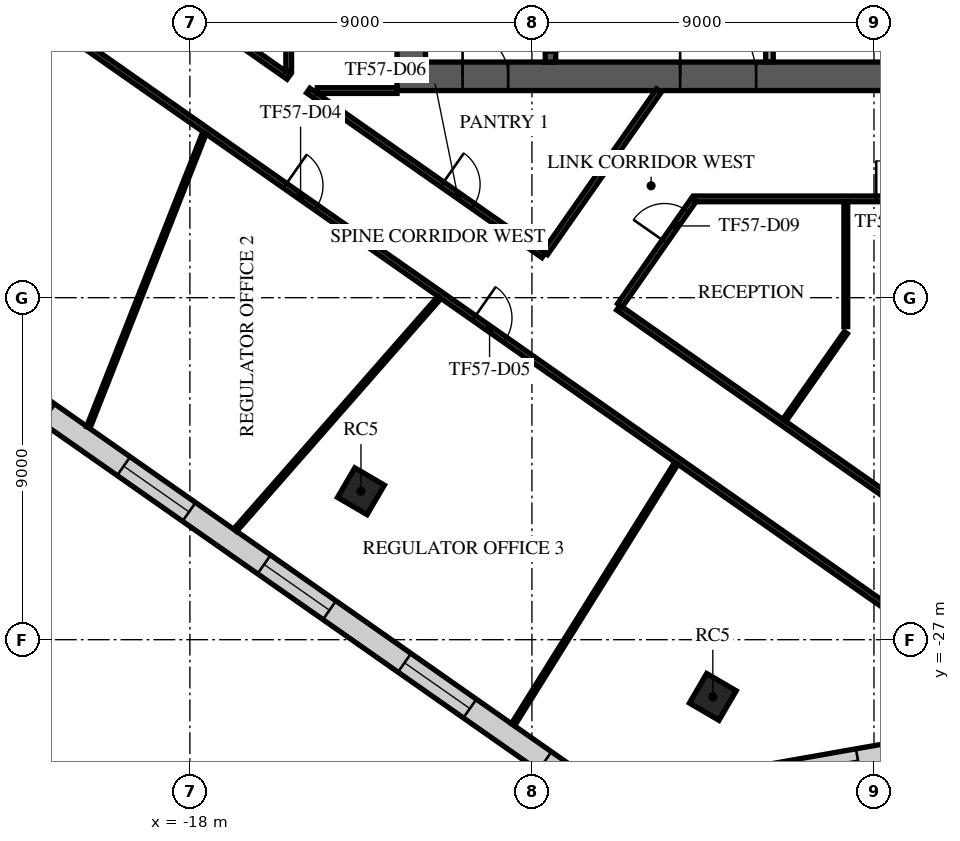
"""IFC4 building model, lengths in metres.
Left out: names, types, materials, properties, quantities, classifications, styles, units other than length and angle.
Written with IfcOpenShell. Run it as: python <this file> out.ifc"""

import sys

from ifc_helpers import new_model, si_unit, direction, frame, frame_2d, origin, origin_2d, place, context, subcontext, project, spatial, rectangle, extrude, element, fill, save


model = new_model("IFC4")
c1 = context("Model", 3, precision=1e-05, world=origin(), true_north=direction((0.0, 1.0)))
c2 = subcontext(c1, "Body", "Model", "MODEL_VIEW")
j1 = project(units=[si_unit("LENGTHUNIT", "METRE"), si_unit("PLANEANGLEUNIT", "RADIAN")], contexts=[c1])
p1 = place(None, origin())
s1 = spatial("IfcSite", under=j1, at=p1, CompositionType="ELEMENT")
p2 = place(p1, origin())
s2 = spatial("IfcBuilding", under=s1, at=p2, CompositionType="ELEMENT")
p3 = place(p2, frame((0.0, 0.0, 246.9)))
s3 = spatial("IfcBuildingStorey", under=s2, at=p3, CompositionType="ELEMENT", Elevation=246.9)
for number, where, z_axis, x_axis in (
    (1, (-13.499, -23.094, 0.0), (0.0, 0.0, 1.0), (0.505, 0.863, 0.0)),
    (2, (-4.24, -28.506, 0.0), (0.0, 0.0, 1.0), (0.505, 0.863, 0.0)),
):
    element("IfcColumn", number, at=place(p3, frame(where, z_axis=z_axis, x_axis=x_axis)), inside=s3, PredefinedType="COLUMN", context=c2, shape_type="SweptSolid", body=[
        extrude(rectangle(XDim=0.9, YDim=0.9, at=origin_2d()), origin(), (0.0, 0.0, 1.0), 4.0),
    ])
p4 = place(p3, frame((-12.55, -12.175, 0.0), z_axis=(0.0, 0.0, 1.0), x_axis=(1.0, 0.0, 0.0)))
e3 = element("IfcWall", 3, at=p4, inside=s3, PredefinedType="SHEAR", context=c2, shape_type="SweptSolid", body=[
    extrude(rectangle(XDim=25.1, YDim=0.75, at=frame_2d((12.55, 0.0))), origin(), (0.0, 0.0, 1.0), 3.64),
])
p5 = place(p4, frame((7.45, 0.0, 0.0)))
e4 = element("IfcOpeningElement", 4, at=p5, cuts=e3, PredefinedType="OPENING", context=c2, shape_type="SweptSolid", body=[
    extrude(rectangle(XDim=2.0, YDim=2.1, at=frame_2d((1.0, 1.05))), frame((0.0, 0.385, 0.0), z_axis=(0.0, -1.0, 0.0), x_axis=(1.0, 0.0, 0.0)), (0.0, 0.0, 1.0), 0.77),
])
p6 = place(p4, frame((17.575, 0.0, 0.0)))
e5 = element("IfcOpeningElement", 5, at=p6, cuts=e3, PredefinedType="OPENING", context=c2, shape_type="SweptSolid", body=[
    extrude(rectangle(XDim=1.2, YDim=2.1, at=frame_2d((0.6, 1.05))), frame((0.0, 0.385, 0.0), z_axis=(0.0, -1.0, 0.0), x_axis=(1.0, 0.0, 0.0)), (0.0, 0.0, 1.0), 0.77),
])
p7 = place(p4, frame((1.725, 0.0, 0.0)))
e6 = element("IfcOpeningElement", 6, at=p7, cuts=e3, PredefinedType="OPENING", context=c2, shape_type="SweptSolid", body=[
    extrude(rectangle(XDim=1.2, YDim=2.1, at=frame_2d((0.6, 1.05))), frame((0.0, 0.385, 0.0), z_axis=(0.0, -1.0, 0.0), x_axis=(1.0, 0.0, 0.0)), (0.0, 0.0, 1.0), 0.77),
])
p8 = place(p4, frame((22.175, 0.0, 0.0)))
e7 = element("IfcOpeningElement", 7, at=p8, cuts=e3, PredefinedType="OPENING", context=c2, shape_type="SweptSolid", body=[
    extrude(rectangle(XDim=1.2, YDim=2.1, at=frame_2d((0.6, 1.05))), frame((0.0, 0.385, 0.0), z_axis=(0.0, -1.0, 0.0), x_axis=(1.0, 0.0, 0.0)), (0.0, 0.0, 1.0), 0.77),
])
p9 = place(p3, frame((-12.175, -11.8, 0.0), z_axis=(0.0, 0.0, 1.0), x_axis=(0.0, 1.0, 0.0)))
e8 = element("IfcWall", 8, at=p9, inside=s3, PredefinedType="SHEAR", context=c2, shape_type="SweptSolid", body=[
    extrude(rectangle(XDim=23.6, YDim=0.75, at=frame_2d((11.8, 0.0))), origin(), (0.0, 0.0, 1.0), 3.64),
])
p10 = place(p9, frame((10.6, 0.0, 0.0)))
e9 = element("IfcOpeningElement", 9, at=p10, cuts=e8, PredefinedType="OPENING", context=c2, shape_type="SweptSolid", body=[
    extrude(rectangle(XDim=2.4, YDim=2.4, at=frame_2d((1.2, 1.2))), frame((0.0, 0.385, 0.0), z_axis=(0.0, -1.0, 0.0), x_axis=(1.0, 0.0, 0.0)), (0.0, 0.0, 1.0), 0.77),
])
p11 = place(p3, frame((-8.512, -4.55, 0.0), z_axis=(0.0, 0.0, 1.0), x_axis=(0.0, -1.0, 0.0)))
e10 = element("IfcWall", 10, at=p11, inside=s3, PredefinedType="SOLIDWALL", context=c2, shape_type="SweptSolid", body=[
    extrude(rectangle(XDim=7.25, YDim=0.275, at=frame_2d((3.625, 0.0))), origin(), (0.0, 0.0, 1.0), 3.64),
])
p12 = place(p11, frame((6.0, 0.0, 0.0)))
e11 = element("IfcOpeningElement", 11, at=p12, cuts=e10, PredefinedType="OPENING", context=c2, shape_type="SweptSolid", body=[
    extrude(rectangle(XDim=1.0, YDim=2.1, at=frame_2d((0.5, 1.05))), frame((0.0, 0.147, 0.0), z_axis=(0.0, -1.0, 0.0), x_axis=(1.0, 0.0, 0.0)), (0.0, 0.0, 1.0), 0.295),
])
p13 = place(p3, frame((-2.75, -11.795, 0.0), z_axis=(0.0, 0.0, 1.0), x_axis=(0.0, 1.0, 0.0)))
e12 = element("IfcWall", 12, at=p13, inside=s3, PredefinedType="PARTITIONING", context=c2, shape_type="SweptSolid", body=[
    extrude(rectangle(XDim=2.99, YDim=0.2, at=frame_2d((1.495, 0.0))), origin(), (0.0, 0.0, 1.0), 3.64),
])
p14 = place(p13, frame((0.657, 0.0, 0.0)))
e13 = element("IfcOpeningElement", 13, at=p14, cuts=e12, PredefinedType="OPENING", context=c2, shape_type="SweptSolid", body=[
    extrude(rectangle(XDim=1.8, YDim=2.1, at=frame_2d((0.9, 1.05))), frame((0.0, 0.11, 0.0), z_axis=(0.0, -1.0, 0.0), x_axis=(1.0, 0.0, 0.0)), (0.0, 0.0, 1.0), 0.22),
])
p15 = place(p3, frame((-31.815, -13.98, 0.0), z_axis=(0.0, 0.0, 1.0), x_axis=(0.819151180661, -0.573577669737, 0.0)))
e14 = element("IfcWall", 14, at=p15, inside=s3, PredefinedType="STANDARD", context=c2, shape_type="SweptSolid", body=[
    extrude(rectangle(XDim=36.086, YDim=0.6, at=frame_2d((18.043, 0.0))), origin(), (0.0, 0.0, 1.0), 3.64),
])
p16 = place(p15, frame((1.205, 0.0, 0.9)))
e15 = element("IfcOpeningElement", 15, at=p16, cuts=e14, PredefinedType="OPENING", context=c2, shape_type="SweptSolid", body=[
    extrude(rectangle(XDim=2.1, YDim=2.1, at=frame_2d((1.05, 1.05))), frame((0.0, 0.31, 0.0), z_axis=(0.0, -1.0, 0.0), x_axis=(1.0, 0.0, 0.0)), (0.0, 0.0, 1.0), 0.62),
])
p17 = place(p15, frame((5.716, 0.0, 0.9)))
e16 = element("IfcOpeningElement", 16, at=p17, cuts=e14, PredefinedType="OPENING", context=c2, shape_type="SweptSolid", body=[
    extrude(rectangle(XDim=2.1, YDim=2.1, at=frame_2d((1.05, 1.05))), frame((0.0, 0.31, 0.0), z_axis=(0.0, -1.0, 0.0), x_axis=(1.0, 0.0, 0.0)), (0.0, 0.0, 1.0), 0.62),
])
p18 = place(p15, frame((10.227, 0.0, 0.9)))
e17 = element("IfcOpeningElement", 17, at=p18, cuts=e14, PredefinedType="OPENING", context=c2, shape_type="SweptSolid", body=[
    extrude(rectangle(XDim=2.1, YDim=2.1, at=frame_2d((1.05, 1.05))), frame((0.0, 0.31, 0.0), z_axis=(0.0, -1.0, 0.0), x_axis=(1.0, 0.0, 0.0)), (0.0, 0.0, 1.0), 0.62),
])
p19 = place(p15, frame((14.738, 0.0, 0.9)))
e18 = element("IfcOpeningElement", 18, at=p19, cuts=e14, PredefinedType="OPENING", context=c2, shape_type="SweptSolid", body=[
    extrude(rectangle(XDim=2.1, YDim=2.1, at=frame_2d((1.05, 1.05))), frame((0.0, 0.31, 0.0), z_axis=(0.0, -1.0, 0.0), x_axis=(1.0, 0.0, 0.0)), (0.0, 0.0, 1.0), 0.62),
])
p20 = place(p15, frame((19.249, 0.0, 0.9)))
e19 = element("IfcOpeningElement", 19, at=p20, cuts=e14, PredefinedType="OPENING", context=c2, shape_type="SweptSolid", body=[
    extrude(rectangle(XDim=2.1, YDim=2.1, at=frame_2d((1.05, 1.05))), frame((0.0, 0.31, 0.0), z_axis=(0.0, -1.0, 0.0), x_axis=(1.0, 0.0, 0.0)), (0.0, 0.0, 1.0), 0.62),
])
p21 = place(p15, frame((23.759, 0.0, 0.9)))
e20 = element("IfcOpeningElement", 20, at=p21, cuts=e14, PredefinedType="OPENING", context=c2, shape_type="SweptSolid", body=[
    extrude(rectangle(XDim=2.1, YDim=2.1, at=frame_2d((1.05, 1.05))), frame((0.0, 0.31, 0.0), z_axis=(0.0, -1.0, 0.0), x_axis=(1.0, 0.0, 0.0)), (0.0, 0.0, 1.0), 0.62),
])
p22 = place(p15, frame((28.27, 0.0, 0.9)))
e21 = element("IfcOpeningElement", 21, at=p22, cuts=e14, PredefinedType="OPENING", context=c2, shape_type="SweptSolid", body=[
    extrude(rectangle(XDim=2.1, YDim=2.1, at=frame_2d((1.05, 1.05))), frame((0.0, 0.31, 0.0), z_axis=(0.0, -1.0, 0.0), x_axis=(1.0, 0.0, 0.0)), (0.0, 0.0, 1.0), 0.62),
])
p23 = place(p15, frame((32.781, 0.0, 0.9)))
e22 = element("IfcOpeningElement", 22, at=p23, cuts=e14, PredefinedType="OPENING", context=c2, shape_type="SweptSolid", body=[
    extrude(rectangle(XDim=2.1, YDim=2.1, at=frame_2d((1.05, 1.05))), frame((0.0, 0.31, 0.0), z_axis=(0.0, -1.0, 0.0), x_axis=(1.0, 0.0, 0.0)), (0.0, 0.0, 1.0), 0.62),
])
p24 = place(p3, frame((-3.18, -30.654, 0.0), z_axis=(0.0, 0.0, 1.0), x_axis=(0.98480904719, 0.173640837858, 0.0)))
e23 = element("IfcWall", 23, at=p24, inside=s3, PredefinedType="STANDARD", context=c2, shape_type="SweptSolid", body=[
    extrude(rectangle(XDim=8.0, YDim=0.6, at=frame_2d((4.0, 0.0))), origin(), (0.0, 0.0, 1.0), 3.64),
])
p25 = place(p24, frame((1.2, 0.0, 0.9)))
e24 = element("IfcOpeningElement", 24, at=p25, cuts=e23, PredefinedType="OPENING", context=c2, shape_type="SweptSolid", body=[
    extrude(rectangle(XDim=1.6, YDim=2.1, at=frame_2d((0.8, 1.05))), frame((0.0, 0.31, 0.0), z_axis=(0.0, -1.0, 0.0), x_axis=(1.0, 0.0, 0.0)), (0.0, 0.0, 1.0), 0.62),
])
p26 = place(p24, frame((5.2, 0.0, 0.9)))
e25 = element("IfcOpeningElement", 25, at=p26, cuts=e23, PredefinedType="OPENING", context=c2, shape_type="SweptSolid", body=[
    extrude(rectangle(XDim=1.6, YDim=2.1, at=frame_2d((0.8, 1.05))), frame((0.0, 0.31, 0.0), z_axis=(0.0, -1.0, 0.0), x_axis=(1.0, 0.0, 0.0)), (0.0, 0.0, 1.0), 0.62),
])
p27 = place(p3, frame((-26.231, -7.537, 0.0), z_axis=(0.0, 0.0, 1.0), x_axis=(0.819166569978, -0.573555690959, 0.0)))
e26 = element("IfcWall", 26, at=p27, inside=s3, PredefinedType="PARTITIONING", context=c2, shape_type="SweptSolid", body=[
    extrude(rectangle(XDim=34.403, YDim=0.15, at=frame_2d((17.201, 0.0))), origin(), (0.0, 0.0, 1.0), 3.24),
])
p28 = place(p27, frame((3.05, 0.0, 0.0)))
e27 = element("IfcOpeningElement", 27, at=p28, cuts=e26, PredefinedType="OPENING", context=c2, shape_type="SweptSolid", body=[
    extrude(rectangle(XDim=1.8, YDim=2.1, at=frame_2d((0.9, 1.05))), frame((0.0, 0.085, 0.0), z_axis=(0.0, -1.0, 0.0), x_axis=(1.0, 0.0, 0.0)), (0.0, 0.0, 1.0), 0.17),
])
p29 = place(p27, frame((13.103, 0.0, 0.0)))
e28 = element("IfcOpeningElement", 28, at=p29, cuts=e26, PredefinedType="OPENING", context=c2, shape_type="SweptSolid", body=[
    extrude(rectangle(XDim=1.0, YDim=2.1, at=frame_2d((0.5, 1.05))), frame((0.0, 0.085, 0.0), z_axis=(0.0, -1.0, 0.0), x_axis=(1.0, 0.0, 0.0)), (0.0, 0.0, 1.0), 0.17),
])
p30 = place(p27, frame((19.173, 0.0, 0.0)))
e29 = element("IfcOpeningElement", 29, at=p30, cuts=e26, PredefinedType="OPENING", context=c2, shape_type="SweptSolid", body=[
    extrude(rectangle(XDim=1.0, YDim=2.1, at=frame_2d((0.5, 1.05))), frame((0.0, 0.085, 0.0), z_axis=(0.0, -1.0, 0.0), x_axis=(1.0, 0.0, 0.0)), (0.0, 0.0, 1.0), 0.17),
])
p31 = place(p3, frame((-24.854, -5.571, 0.0), z_axis=(0.0, 0.0, 1.0), x_axis=(0.819176259714, -0.573541851586, 0.0)))
e30 = element("IfcWall", 30, at=p31, inside=s3, PredefinedType="PARTITIONING", context=c2, shape_type="SweptSolid", body=[
    extrude(rectangle(XDim=11.54, YDim=0.15, at=frame_2d((5.77, 0.0))), origin(), (0.0, 0.0, 1.0), 3.24),
])
p32 = place(p31, frame((6.8, 0.0, 0.0)))
e31 = element("IfcOpeningElement", 31, at=p32, cuts=e30, PredefinedType="OPENING", context=c2, shape_type="SweptSolid", body=[
    extrude(rectangle(XDim=1.0, YDim=2.1, at=frame_2d((0.5, 1.05))), frame((0.0, 0.085, 0.0), z_axis=(0.0, -1.0, 0.0), x_axis=(1.0, 0.0, 0.0)), (0.0, 0.0, 1.0), 0.17),
])
p33 = place(p3, frame((-15.4, -12.046, 0.0), z_axis=(0.0, 0.0, 1.0), x_axis=(0.0, 1.0, 0.0)))
e32 = element("IfcWall", 32, at=p33, inside=s3, PredefinedType="PARTITIONING", context=c2, shape_type="SweptSolid", body=[
    extrude(rectangle(XDim=27.446, YDim=0.15, at=frame_2d((13.723, 0.0))), origin(), (0.0, 0.0, 1.0), 3.24),
])
p34 = place(p33, frame((12.961, 0.0, 0.0)))
e33 = element("IfcOpeningElement", 33, at=p34, cuts=e32, PredefinedType="OPENING", context=c2, shape_type="SweptSolid", body=[
    extrude(rectangle(XDim=1.0, YDim=2.1, at=frame_2d((0.5, 1.05))), frame((0.0, 0.085, 0.0), z_axis=(0.0, -1.0, 0.0), x_axis=(1.0, 0.0, 0.0)), (0.0, 0.0, 1.0), 0.17),
])
p35 = place(p3, frame((-14.886, -12.55, 0.0), z_axis=(0.0, 0.0, 1.0), x_axis=(0.819131763787, -0.57360539882, 0.0)))
e34 = element("IfcWall", 34, at=p35, inside=s3, PredefinedType="PARTITIONING", context=c2, shape_type="SweptSolid", body=[
    extrude(rectangle(XDim=7.559, YDim=0.15, at=frame_2d((3.78, 0.0))), origin(), (0.0, 0.0, 1.0), 3.24),
])
p36 = place(p35, frame((4.3, 0.0, 0.0)))
e35 = element("IfcOpeningElement", 35, at=p36, cuts=e34, PredefinedType="OPENING", context=c2, shape_type="SweptSolid", body=[
    extrude(rectangle(XDim=1.0, YDim=2.1, at=frame_2d((0.5, 1.05))), frame((0.0, 0.085, 0.0), z_axis=(0.0, -1.0, 0.0), x_axis=(1.0, 0.0, 0.0)), (0.0, 0.0, 1.0), 0.17),
])
p37 = place(p3, frame((-14.648, -12.55, 0.0), z_axis=(0.0, 0.0, 1.0), x_axis=(1.0, 0.0, 0.0)))
e36 = element("IfcWall", 36, at=p37, inside=s3, PredefinedType="PARTITIONING", context=c2, shape_type="SweptSolid", body=[
    extrude(rectangle(XDim=2.098, YDim=0.15, at=frame_2d((1.049, 0.0))), origin(), (0.0, 0.0, 1.0), 3.24),
])
p38 = place(p3, frame((-8.651, -16.825, 0.0), z_axis=(0.0, 0.0, 1.0), x_axis=(0.57354712093, 0.819172570386, 0.0)))
e37 = element("IfcWall", 37, at=p38, inside=s3, PredefinedType="PARTITIONING", context=c2, shape_type="SweptSolid", body=[
    extrude(rectangle(XDim=5.218, YDim=0.15, at=frame_2d((2.609, 0.0))), origin(), (0.0, 0.0, 1.0), 3.24),
])
p39 = place(p3, frame((-6.728, -18.263, 0.0), z_axis=(0.0, 0.0, 1.0), x_axis=(0.819171177891, -0.573549109765, 0.0)))
e38 = element("IfcWall", 38, at=p39, inside=s3, PredefinedType="PARTITIONING", context=c2, shape_type="SweptSolid", body=[
    extrude(rectangle(XDim=12.274, YDim=0.15, at=frame_2d((6.137, 0.0))), origin(), (0.0, 0.0, 1.0), 3.24),
])
p40 = place(p3, frame((-6.685, -18.201, 0.0), z_axis=(0.0, 0.0, 1.0), x_axis=(0.573438386326, 0.819248690623, 0.0)))
e39 = element("IfcWall", 39, at=p40, inside=s3, PredefinedType="PARTITIONING", context=c2, shape_type="SweptSolid", body=[
    extrude(rectangle(XDim=3.42, YDim=0.15, at=frame_2d((1.71, 0.0))), origin(), (0.0, 0.0, 1.0), 3.24),
])
p41 = place(p40, frame((2.05, 0.0, 0.0)))
e40 = element("IfcOpeningElement", 40, at=p41, cuts=e39, PredefinedType="OPENING", context=c2, shape_type="SweptSolid", body=[
    extrude(rectangle(XDim=1.0, YDim=2.1, at=frame_2d((0.5, 1.05))), frame((0.0, 0.085, 0.0), z_axis=(0.0, -1.0, 0.0), x_axis=(1.0, 0.0, 0.0)), (0.0, 0.0, 1.0), 0.17),
])
p42 = place(p3, frame((-4.723, -15.4, 0.0), z_axis=(0.0, 0.0, 1.0), x_axis=(1.0, 0.0, 0.0)))
e41 = element("IfcWall", 41, at=p42, inside=s3, PredefinedType="PARTITIONING", context=c2, shape_type="SweptSolid", body=[
    extrude(rectangle(XDim=20.123, YDim=0.15, at=frame_2d((10.062, 0.0))), origin(), (0.0, 0.0, 1.0), 3.24),
])
p43 = place(p42, frame((13.282, 0.0, 0.0)))
e42 = element("IfcOpeningElement", 42, at=p43, cuts=e41, PredefinedType="OPENING", context=c2, shape_type="SweptSolid", body=[
    extrude(rectangle(XDim=1.8, YDim=2.1, at=frame_2d((0.9, 1.05))), frame((0.0, 0.085, 0.0), z_axis=(0.0, -1.0, 0.0), x_axis=(1.0, 0.0, 0.0)), (0.0, 0.0, 1.0), 0.17),
])
p44 = place(p42, frame((4.782, 0.0, 0.0)))
e43 = element("IfcOpeningElement", 43, at=p44, cuts=e41, PredefinedType="OPENING", context=c2, shape_type="SweptSolid", body=[
    extrude(rectangle(XDim=1.0, YDim=2.1, at=frame_2d((0.5, 1.05))), frame((0.0, 0.085, 0.0), z_axis=(0.0, -1.0, 0.0), x_axis=(1.0, 0.0, 0.0)), (0.0, 0.0, 1.0), 0.17),
])
p45 = place(p3, frame((-20.673, -21.413, 0.0), z_axis=(0.0, 0.0, 1.0), x_axis=(0.367046287702, 0.930202678283, 0.0)))
e44 = element("IfcWall", 44, at=p45, inside=s3, PredefinedType="PARTITIONING", context=c2, shape_type="SweptSolid", body=[
    extrude(rectangle(XDim=8.321, YDim=0.1, at=frame_2d((4.161, 0.0))), origin(), (0.0, 0.0, 1.0), 3.24),
])
p46 = place(p3, frame((-16.809, -24.119, 0.0), z_axis=(0.0, 0.0, 1.0), x_axis=(0.659598527061, 0.75161810988, 0.0)))
e45 = element("IfcWall", 45, at=p46, inside=s3, PredefinedType="PARTITIONING", context=c2, shape_type="SweptSolid", body=[
    extrude(rectangle(XDim=8.148, YDim=0.1, at=frame_2d((4.074, 0.0))), origin(), (0.0, 0.0, 1.0), 3.24),
])
p47 = place(p3, frame((-9.498, -29.238, 0.0), z_axis=(0.0, 0.0, 1.0), x_axis=(0.529739230274, 0.848160567292, 0.0)))
e46 = element("IfcWall", 46, at=p47, inside=s3, PredefinedType="PARTITIONING", context=c2, shape_type="SweptSolid", body=[
    extrude(rectangle(XDim=8.113, YDim=0.1, at=frame_2d((4.056, 0.0))), origin(), (0.0, 0.0, 1.0), 3.64),
])
p48 = place(p3, frame((-2.359, -21.231, 0.0), z_axis=(0.0, 0.0, 1.0), x_axis=(0.573549469352, 0.819170926123, 0.0)))
e47 = element("IfcWall", 47, at=p48, inside=s3, PredefinedType="PARTITIONING", context=c2, shape_type="SweptSolid", body=[
    extrude(rectangle(XDim=2.821, YDim=0.1, at=frame_2d((1.41, 0.0))), origin(), (0.0, 0.0, 1.0), 3.64),
])
p49 = place(p3, frame((-0.741, -18.761, 0.0), z_axis=(0.0, 0.0, 1.0), x_axis=(0.0, 1.0, 0.0)))
e48 = element("IfcWall", 48, at=p49, inside=s3, PredefinedType="PARTITIONING", context=c2, shape_type="SweptSolid", body=[
    extrude(rectangle(XDim=3.286, YDim=0.1, at=frame_2d((1.643, 0.0))), origin(), (0.0, 0.0, 1.0), 3.64),
])
p50 = place(p5, origin())
e49 = element("IfcDoor", 49, at=p50, inside=s3, OperationType="SINGLE_SWING_LEFT", PredefinedType="DOOR", context=c2, shape_type="SweptSolid", body=[
    extrude(rectangle(XDim=2.0, YDim=2.1, at=frame_2d((1.0, 1.05))), frame((0.0, 0.025, 0.0), z_axis=(0.0, -1.0, 0.0), x_axis=(1.0, 0.0, 0.0)), (0.0, 0.0, 1.0), 0.05),
])
fill(e4, e49)
p51 = place(p7, origin())
e50 = element("IfcDoor", 50, at=p51, inside=s3, OperationType="SINGLE_SWING_LEFT", PredefinedType="DOOR", context=c2, shape_type="SweptSolid", body=[
    extrude(rectangle(XDim=1.2, YDim=2.1, at=frame_2d((0.6, 1.05))), frame((0.0, 0.025, 0.0), z_axis=(0.0, -1.0, 0.0), x_axis=(1.0, 0.0, 0.0)), (0.0, 0.0, 1.0), 0.05),
])
fill(e6, e50)
p52 = place(p19, origin())
e51 = element("IfcWindow", 51, at=p52, inside=s3, PartitioningType="SINGLE_PANEL", PredefinedType="WINDOW", context=c2, shape_type="SweptSolid", body=[
    extrude(rectangle(XDim=2.1, YDim=2.1, at=frame_2d((1.05, 1.05))), frame((0.0, 0.03, 0.0), z_axis=(0.0, -1.0, 0.0), x_axis=(1.0, 0.0, 0.0)), (0.0, 0.0, 1.0), 0.06),
])
fill(e18, e51)
p53 = place(p20, origin())
e52 = element("IfcWindow", 52, at=p53, inside=s3, PartitioningType="SINGLE_PANEL", PredefinedType="WINDOW", context=c2, shape_type="SweptSolid", body=[
    extrude(rectangle(XDim=2.1, YDim=2.1, at=frame_2d((1.05, 1.05))), frame((0.0, 0.03, 0.0), z_axis=(0.0, -1.0, 0.0), x_axis=(1.0, 0.0, 0.0)), (0.0, 0.0, 1.0), 0.06),
])
fill(e19, e52)
p54 = place(p21, origin())
e53 = element("IfcWindow", 53, at=p54, inside=s3, PartitioningType="SINGLE_PANEL", PredefinedType="WINDOW", context=c2, shape_type="SweptSolid", body=[
    extrude(rectangle(XDim=2.1, YDim=2.1, at=frame_2d((1.05, 1.05))), frame((0.0, 0.03, 0.0), z_axis=(0.0, -1.0, 0.0), x_axis=(1.0, 0.0, 0.0)), (0.0, 0.0, 1.0), 0.06),
])
fill(e20, e53)
p55 = place(p22, origin())
e54 = element("IfcWindow", 54, at=p55, inside=s3, PartitioningType="SINGLE_PANEL", PredefinedType="WINDOW", context=c2, shape_type="SweptSolid", body=[
    extrude(rectangle(XDim=2.1, YDim=2.1, at=frame_2d((1.05, 1.05))), frame((0.0, 0.03, 0.0), z_axis=(0.0, -1.0, 0.0), x_axis=(1.0, 0.0, 0.0)), (0.0, 0.0, 1.0), 0.06),
])
fill(e21, e54)
p56 = place(p25, origin())
e55 = element("IfcWindow", 55, at=p56, inside=s3, PartitioningType="SINGLE_PANEL", PredefinedType="WINDOW", context=c2, shape_type="SweptSolid", body=[
    extrude(rectangle(XDim=1.6, YDim=2.1, at=frame_2d((0.8, 1.05))), frame((0.0, 0.03, 0.0), z_axis=(0.0, -1.0, 0.0), x_axis=(1.0, 0.0, 0.0)), (0.0, 0.0, 1.0), 0.06),
])
fill(e24, e55)
p57 = place(p29, frame((1.0, 0.0, 0.0), z_axis=(0.0, 0.0, 1.0), x_axis=(-1.0, 0.0, 0.0)))
e56 = element("IfcDoor", 56, at=p57, inside=s3, OperationType="SINGLE_SWING_LEFT", PredefinedType="DOOR", context=c2, shape_type="SweptSolid", body=[
    extrude(rectangle(XDim=1.0, YDim=2.1, at=frame_2d((0.5, 1.05))), frame((0.0, 0.025, 0.0), z_axis=(0.0, -1.0, 0.0), x_axis=(1.0, 0.0, 0.0)), (0.0, 0.0, 1.0), 0.05),
])
fill(e28, e56)
p58 = place(p30, frame((1.0, 0.0, 0.0), z_axis=(0.0, 0.0, 1.0), x_axis=(-1.0, 0.0, 0.0)))
e57 = element("IfcDoor", 57, at=p58, inside=s3, OperationType="SINGLE_SWING_RIGHT", PredefinedType="DOOR", context=c2, shape_type="SweptSolid", body=[
    extrude(rectangle(XDim=1.0, YDim=2.1, at=frame_2d((0.5, 1.05))), frame((0.0, 0.025, 0.0), z_axis=(0.0, -1.0, 0.0), x_axis=(1.0, 0.0, 0.0)), (0.0, 0.0, 1.0), 0.05),
])
fill(e29, e57)
p59 = place(p36, origin())
e58 = element("IfcDoor", 58, at=p59, inside=s3, OperationType="SINGLE_SWING_LEFT", PredefinedType="DOOR", context=c2, shape_type="SweptSolid", body=[
    extrude(rectangle(XDim=1.0, YDim=2.1, at=frame_2d((0.5, 1.05))), frame((0.0, 0.025, 0.0), z_axis=(0.0, -1.0, 0.0), x_axis=(1.0, 0.0, 0.0)), (0.0, 0.0, 1.0), 0.05),
])
fill(e35, e58)
p60 = place(p41, frame((1.0, 0.0, 0.0), z_axis=(0.0, 0.0, 1.0), x_axis=(-1.0, 0.0, 0.0)))
e59 = element("IfcDoor", 59, at=p60, inside=s3, OperationType="SINGLE_SWING_LEFT", PredefinedType="DOOR", context=c2, shape_type="SweptSolid", body=[
    extrude(rectangle(XDim=1.0, YDim=2.1, at=frame_2d((0.5, 1.05))), frame((0.0, 0.025, 0.0), z_axis=(0.0, -1.0, 0.0), x_axis=(1.0, 0.0, 0.0)), (0.0, 0.0, 1.0), 0.05),
])
fill(e40, e59)
p61 = place(p44, frame((1.0, 0.0, 0.0), z_axis=(0.0, 0.0, 1.0), x_axis=(-1.0, 0.0, 0.0)))
e60 = element("IfcDoor", 60, at=p61, inside=s3, OperationType="SINGLE_SWING_RIGHT", PredefinedType="DOOR", context=c2, shape_type="SweptSolid", body=[
    extrude(rectangle(XDim=1.0, YDim=2.1, at=frame_2d((0.5, 1.05))), frame((0.0, 0.025, 0.0), z_axis=(0.0, -1.0, 0.0), x_axis=(1.0, 0.0, 0.0)), (0.0, 0.0, 1.0), 0.05),
])
fill(e43, e60)
save(model, sys.argv[1])
